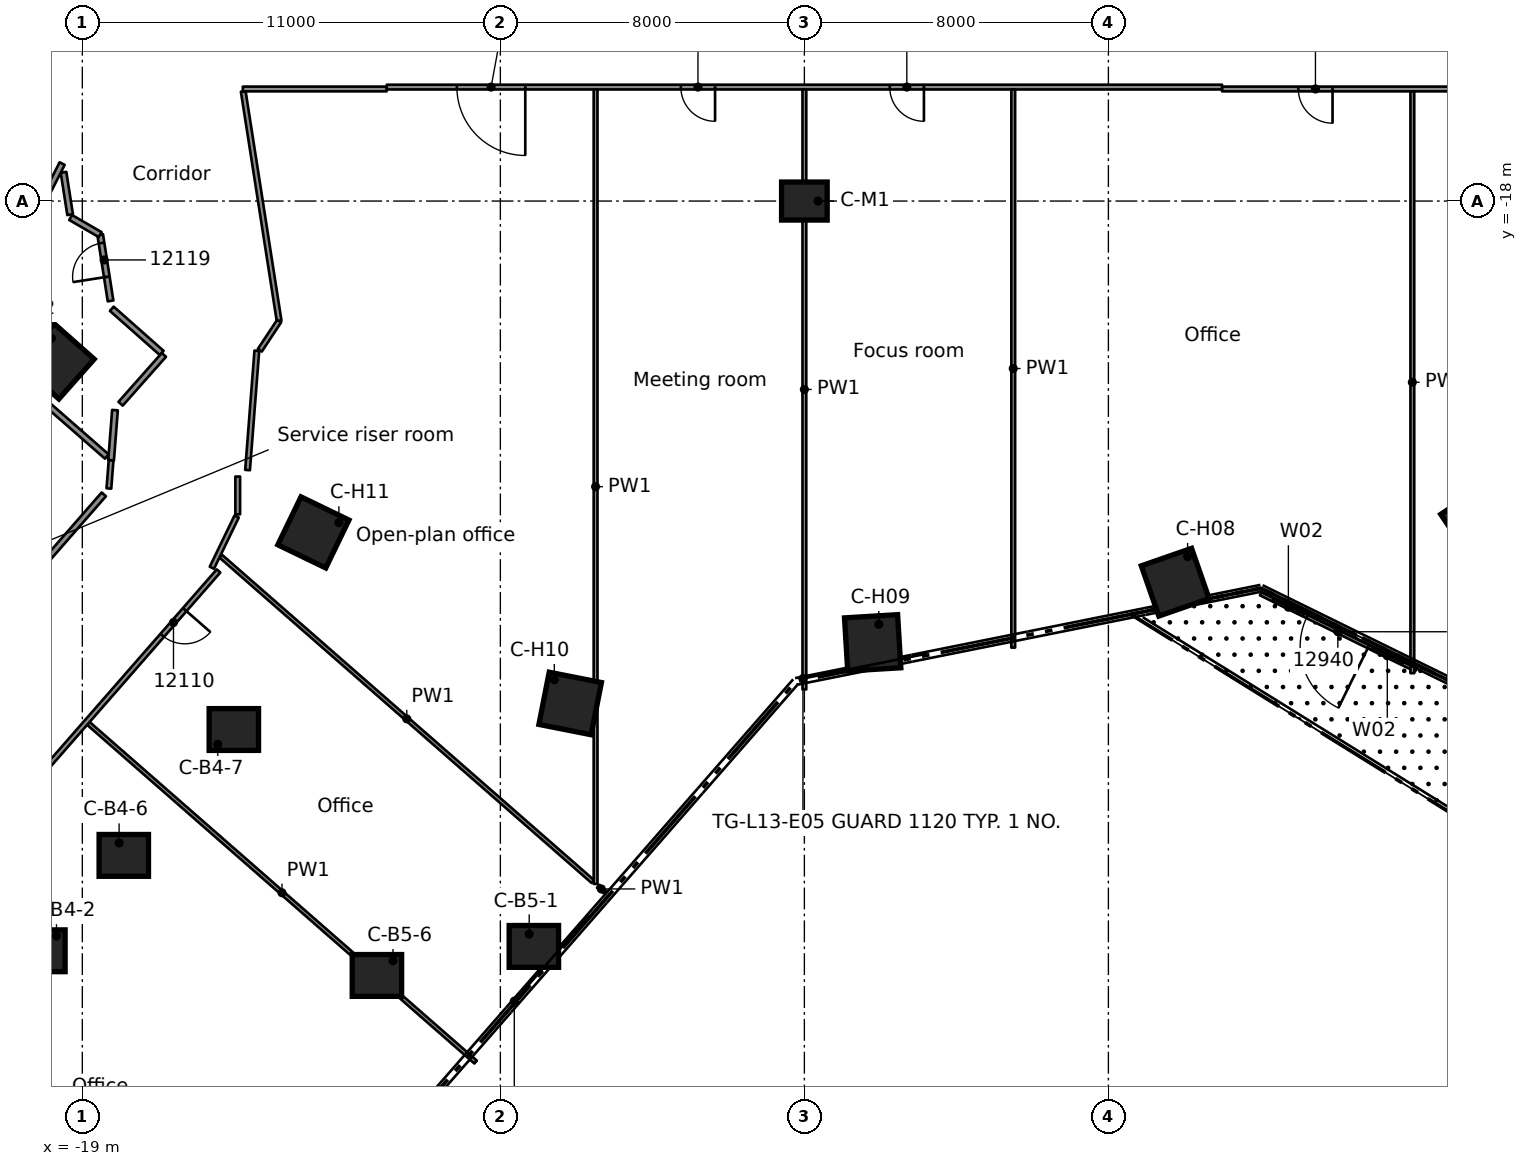
"""IFC4 building model, lengths in metres.
Left out: names, types, materials, properties, quantities, classifications, styles, units other than length and angle.
Written with IfcOpenShell. Run it as: python <this file> out.ifc"""

import sys

from ifc_helpers import new_model, si_unit, direction, frame, frame_2d, origin, origin_2d, place, context, subcontext, project, spatial, rectangle, extrude, element, fill, save


model = new_model("IFC4")
c1 = context("Model", 3, precision=1e-05, world=origin(), true_north=direction((0.0, 1.0)))
c2 = subcontext(c1, "Body", "Model", "MODEL_VIEW")
j1 = project(units=[si_unit("LENGTHUNIT", "METRE"), si_unit("PLANEANGLEUNIT", "RADIAN")], contexts=[c1])
p1 = place(None, origin())
s1 = spatial("IfcSite", under=j1, at=p1, CompositionType="ELEMENT")
p2 = place(p1, origin())
s2 = spatial("IfcBuilding", under=s1, at=p2, CompositionType="ELEMENT")
p3 = place(p2, frame((0.0, 0.0, 58.8)))
s3 = spatial("IfcBuildingStorey", under=s2, at=p3, CompositionType="ELEMENT", Elevation=58.8)
for number, where, z_axis, x_axis in (
    (1, (-20.103, -37.727, 0.0), (0.0, 0.0, 1.0), (1.0, 0.0, 0.0)),
    (2, (-17.909, -35.217, 0.0), (0.0, 0.0, 1.0), (1.0, 0.0, 0.0)),
    (3, (-15.013, -31.905, 0.0), (0.0, 0.0, 1.0), (1.0, 0.0, 0.0)),
    (4, (-7.118, -37.612, 0.0), (0.0, 0.0, 1.0), (1.0, 0.0, 0.0)),
    (5, (-11.248, -38.376, 0.0), (0.0, 0.0, 1.0), (1.0, 0.0, 0.0)),
):
    element("IfcColumn", number, at=place(p3, frame(where, z_axis=z_axis, x_axis=x_axis)), inside=s3, PredefinedType="COLUMN", context=c2, shape_type="SweptSolid", body=[
        extrude(rectangle(XDim=1.3, YDim=1.1, at=origin_2d()), origin(), (0.0, 0.0, 1.0), 3.5),
    ])
for number, where, z_axis, x_axis in (
    (6, (17.718, -26.434, 0.0), (0.0, 0.0, 1.0), (0.557, -0.831, 0.0)),
    (7, (9.758, -28.029, 0.0), (0.0, 0.0, 1.0), (0.329, -0.944, 0.0)),
    (8, (1.797, -29.624, 0.0), (0.0, 0.0, 1.0), (0.061, -0.998, 0.0)),
    (9, (-6.163, -31.22, 0.0), (0.0, 0.0, 1.0), (-0.194, -0.981, 0.0)),
    (10, (-12.92, -26.719, 0.0), (0.0, 0.0, 1.0), (-0.435, -0.9, 0.0)),
    (11, (-19.677, -22.219, 0.0), (0.0, 0.0, 1.0), (-0.663, -0.749, 0.0)),
):
    element("IfcColumn", number, at=place(p3, frame(where, z_axis=z_axis, x_axis=x_axis)), inside=s3, PredefinedType="COLUMN", context=c2, shape_type="SweptSolid", body=[
        extrude(rectangle(XDim=1.4, YDim=1.4, at=origin_2d()), origin(), (0.0, 0.0, 1.0), 3.5),
    ])
p4 = place(p3, frame((0.0, -18.0, 0.0), z_axis=(0.0, 0.0, 1.0), x_axis=(1.0, 0.0, 0.0)))
e12 = element("IfcColumn", 12, at=p4, inside=s3, PredefinedType="COLUMN", context=c2, shape_type="SweptSolid", body=[
    extrude(rectangle(XDim=1.2, YDim=1.0, at=origin_2d()), origin(), (0.0, 0.0, 1.0), 3.5),
])
p5 = place(p3, frame((16.094, -30.336, 0.0), z_axis=(0.0, 0.0, 1.0), x_axis=(-0.897538680415, 0.440935729056, 0.0)))
e13 = element("IfcWall", 13, at=p5, inside=s3, PredefinedType="STANDARD", context=c2, shape_type="SweptSolid", body=[
    extrude(rectangle(XDim=4.55, YDim=0.1, at=frame_2d((2.275, 0.0))), origin(), (0.0, 0.0, 1.0), 3.1),
])
p6 = place(p5, frame((1.39, 0.0, 0.0)))
e14 = element("IfcOpeningElement", 14, at=p6, cuts=e13, PredefinedType="OPENING", context=c2, shape_type="SweptSolid", body=[
    extrude(rectangle(XDim=1.8, YDim=2.4, at=frame_2d((0.9, 1.2))), frame((0.0, 0.06, 0.0), z_axis=(0.0, -1.0, 0.0), x_axis=(1.0, 0.0, 0.0)), (0.0, 0.0, 1.0), 0.12),
])
p7 = place(p5, frame((0.39, 0.0, 0.0)))
e15 = element("IfcOpeningElement", 15, at=p7, cuts=e13, PredefinedType="OPENING", context=c2, shape_type="SweptSolid", body=[
    extrude(rectangle(XDim=0.9, YDim=2.4, at=frame_2d((0.45, 1.2))), frame((0.0, 0.06, 0.0), z_axis=(0.0, -1.0, 0.0), x_axis=(1.0, 0.0, 0.0)), (0.0, 0.0, 1.0), 0.12),
])
p8 = place(p5, frame((3.291, 0.0, 0.0)))
e16 = element("IfcOpeningElement", 16, at=p8, cuts=e13, PredefinedType="OPENING", context=c2, shape_type="SweptSolid", body=[
    extrude(rectangle(XDim=0.9, YDim=2.4, at=frame_2d((0.45, 1.2))), frame((0.0, 0.06, 0.0), z_axis=(0.0, -1.0, 0.0), x_axis=(1.0, 0.0, 0.0)), (0.0, 0.0, 1.0), 0.12),
])
p9 = place(p3, frame((-19.495, -17.243, 0.0), z_axis=(0.0, 0.0, 1.0), x_axis=(0.154251487581, -0.988031618208, 0.0)))
e17 = element("IfcWall", 17, at=p9, inside=s3, PredefinedType="PARTITIONING", context=c2, shape_type="SweptSolid", body=[
    extrude(rectangle(XDim=1.128, YDim=0.15, at=frame_2d((0.564, 0.0))), origin(), (0.0, 0.0, 1.0), 3.08),
])
p10 = place(p3, frame((-18.257, -20.628, 0.0), z_axis=(0.0, 0.0, 1.0), x_axis=(-0.154549773899, 0.987985003625, 0.0)))
e18 = element("IfcWall", 18, at=p10, inside=s3, PredefinedType="PARTITIONING", context=c2, shape_type="SweptSolid", body=[
    extrude(rectangle(XDim=1.766, YDim=0.15, at=frame_2d((0.883, 0.0))), origin(), (0.0, 0.0, 1.0), 3.08),
])
p11 = place(p10, frame((0.642, 0.0, 0.0)))
e19 = element("IfcOpeningElement", 19, at=p11, cuts=e18, PredefinedType="OPENING", context=c2, shape_type="SweptSolid", body=[
    extrude(rectangle(XDim=0.9, YDim=2.1, at=frame_2d((0.45, 1.05))), frame((0.0, 0.085, 0.0), z_axis=(0.0, -1.0, 0.0), x_axis=(1.0, 0.0, 0.0)), (0.0, 0.0, 1.0), 0.17),
])
p12 = place(p3, frame((-14.766, -15.113, 0.0), z_axis=(0.0, 0.0, 1.0), x_axis=(0.154488884016, -0.987994526663, 0.0)))
e20 = element("IfcWall", 20, at=p12, inside=s3, PredefinedType="PARTITIONING", context=c2, shape_type="SweptSolid", body=[
    extrude(rectangle(XDim=6.117, YDim=0.125, at=frame_2d((3.059, 0.0))), origin(), (0.0, 0.0, 1.0), 3.08),
])
p13 = place(p3, frame((-18.225, -20.834, 0.0), z_axis=(0.0, 0.0, 1.0), x_axis=(0.748818770909, -0.662774809671, 0.0)))
e21 = element("IfcWall", 21, at=p13, inside=s3, PredefinedType="PARTITIONING", context=c2, shape_type="SweptSolid", body=[
    extrude(rectangle(XDim=1.756, YDim=0.15, at=frame_2d((0.878, 0.0))), origin(), (0.0, 0.0, 1.0), 3.08),
])
p14 = place(p3, frame((-18.841, -31.745, 0.0), z_axis=(0.0, 0.0, 1.0), x_axis=(0.752778878966, -0.65827346854, 0.0)))
e22 = element("IfcWall", 22, at=p14, inside=s3, PredefinedType="PARTITIONING", context=c2, shape_type="SweptSolid", body=[
    extrude(rectangle(XDim=13.537, YDim=0.1, at=frame_2d((6.769, 0.0))), origin(), (0.0, 0.0, 1.0), 3.08),
])
p15 = place(p3, frame((-22.444, -21.147, 0.0), z_axis=(0.0, 0.0, 1.0), x_axis=(0.75277438398, -0.658278608815, 0.0)))
e23 = element("IfcWall", 23, at=p15, inside=s3, PredefinedType="PARTITIONING", context=c2, shape_type="SweptSolid", body=[
    extrude(rectangle(XDim=5.431, YDim=0.15, at=frame_2d((2.715, 0.0))), origin(), (0.0, 0.0, 1.0), 3.08),
])
p16 = place(p3, frame((-15.359, -27.343, 0.0), z_axis=(0.0, 0.0, 1.0), x_axis=(0.752799867841, -0.658249465612, 0.0)))
e24 = element("IfcWall", 24, at=p16, inside=s3, PredefinedType="PARTITIONING", context=c2, shape_type="SweptSolid", body=[
    extrude(rectangle(XDim=13.009, YDim=0.1, at=frame_2d((6.504, 0.0))), origin(), (0.0, 0.0, 1.0), 3.08),
])
p17 = place(p3, frame((-5.426, -36.028, 0.0), z_axis=(0.0, 0.0, 1.0), x_axis=(0.753404579801, -0.657557251602, 0.0)))
e25 = element("IfcWall", 25, at=p17, inside=s3, PredefinedType="PARTITIONING", context=c2, shape_type="SweptSolid", body=[
    extrude(rectangle(XDim=0.219, YDim=0.1, at=frame_2d((0.109, 0.0))), origin(), (0.0, 0.0, 1.0), 3.08),
])
p18 = place(p3, frame((-14.776, -15.051, 0.0), z_axis=(0.0, 0.0, 1.0), x_axis=(1.0, 0.0, 0.0)))
e26 = element("IfcWall", 26, at=p18, inside=s3, PredefinedType="PARTITIONING", context=c2, shape_type="SweptSolid", body=[
    extrude(rectangle(XDim=3.785, YDim=0.125, at=frame_2d((1.893, 0.0))), origin(), (0.0, 0.0, 1.0), 3.08),
])
p19 = place(p3, frame((20.906, -15.051, 0.0), z_axis=(0.0, 0.0, 1.0), x_axis=(-1.0, 0.0, 0.0)))
e27 = element("IfcWall", 27, at=p19, inside=s3, PredefinedType="PARTITIONING", context=c2, shape_type="SweptSolid", body=[
    extrude(rectangle(XDim=9.915, YDim=0.125, at=frame_2d((4.958, 0.0))), origin(), (0.0, 0.0, 1.0), 3.08),
])
p20 = place(p19, frame((7.008, 0.0, 0.0)))
e28 = element("IfcOpeningElement", 28, at=p20, cuts=e27, PredefinedType="OPENING", context=c2, shape_type="SweptSolid", body=[
    extrude(rectangle(XDim=0.9, YDim=2.1, at=frame_2d((0.45, 1.05))), frame((0.0, 0.073, 0.0), z_axis=(0.0, -1.0, 0.0), x_axis=(1.0, 0.0, 0.0)), (0.0, 0.0, 1.0), 0.145),
])
p21 = place(p19, frame((2.002, 0.0, 0.0)))
e29 = element("IfcOpeningElement", 29, at=p21, cuts=e27, PredefinedType="OPENING", context=c2, shape_type="SweptSolid", body=[
    extrude(rectangle(XDim=0.9, YDim=2.1, at=frame_2d((0.45, 1.05))), frame((0.0, 0.073, 0.0), z_axis=(0.0, -1.0, 0.0), x_axis=(1.0, 0.0, 0.0)), (0.0, 0.0, 1.0), 0.145),
])
p22 = place(p3, frame((10.99, -15.001, 0.0), z_axis=(0.0, 0.0, 1.0), x_axis=(-1.0, 0.0, 0.0)))
e30 = element("IfcWall", 30, at=p22, inside=s3, PredefinedType="PARTITIONING", context=c2, shape_type="SweptSolid", body=[
    extrude(rectangle(XDim=21.98, YDim=0.125, at=frame_2d((10.99, 0.0))), origin(), (0.0, 0.0, 1.0), 3.08),
])
p23 = place(p22, frame((18.334, 0.0, 0.0)))
e31 = element("IfcOpeningElement", 31, at=p23, cuts=e30, PredefinedType="OPENING", context=c2, shape_type="SweptSolid", body=[
    extrude(rectangle(XDim=1.8, YDim=2.1, at=frame_2d((0.9, 1.05))), frame((0.0, 0.073, 0.0), z_axis=(0.0, -1.0, 0.0), x_axis=(1.0, 0.0, 0.0)), (0.0, 0.0, 1.0), 0.145),
])
p24 = place(p22, frame((13.34, 0.0, 0.0)))
e32 = element("IfcOpeningElement", 32, at=p24, cuts=e30, PredefinedType="OPENING", context=c2, shape_type="SweptSolid", body=[
    extrude(rectangle(XDim=0.9, YDim=2.1, at=frame_2d((0.45, 1.05))), frame((0.0, 0.073, 0.0), z_axis=(0.0, -1.0, 0.0), x_axis=(1.0, 0.0, 0.0)), (0.0, 0.0, 1.0), 0.145),
])
p25 = place(p22, frame((7.844, 0.0, 0.0)))
e33 = element("IfcOpeningElement", 33, at=p25, cuts=e30, PredefinedType="OPENING", context=c2, shape_type="SweptSolid", body=[
    extrude(rectangle(XDim=0.9, YDim=2.1, at=frame_2d((0.45, 1.05))), frame((0.0, 0.073, 0.0), z_axis=(0.0, -1.0, 0.0), x_axis=(1.0, 0.0, 0.0)), (0.0, 0.0, 1.0), 0.145),
])
p26 = place(p3, frame((-14.33, -21.927, 0.0), z_axis=(0.0, 0.0, 1.0), x_axis=(0.551461091015, 0.834200614418, 0.0)))
e34 = element("IfcWall", 34, at=p26, inside=s3, PredefinedType="PARTITIONING", context=c2, shape_type="SweptSolid", body=[
    extrude(rectangle(XDim=0.923, YDim=0.125, at=frame_2d((0.461, 0.0))), origin(), (0.0, 0.0, 1.0), 3.08),
])
p27 = place(p3, frame((-19.308, -18.433, 0.0), z_axis=(0.0, 0.0, 1.0), x_axis=(0.865674137441, -0.5006079182, 0.0)))
e35 = element("IfcWall", 35, at=p27, inside=s3, PredefinedType="PARTITIONING", context=c2, shape_type="SweptSolid", body=[
    extrude(rectangle(XDim=0.899, YDim=0.15, at=frame_2d((0.449, 0.0))), origin(), (0.0, 0.0, 1.0), 3.08),
])
p28 = place(p3, frame((-17.993, -23.333, 0.0), z_axis=(0.0, 0.0, 1.0), x_axis=(0.663312943568, 0.748342126902, 0.0)))
e36 = element("IfcWall", 36, at=p28, inside=s3, PredefinedType="PARTITIONING", context=c2, shape_type="SweptSolid", body=[
    extrude(rectangle(XDim=1.717, YDim=0.15, at=frame_2d((0.858, 0.0))), origin(), (0.0, 0.0, 1.0), 3.08),
])
p29 = place(p3, frame((-15.416, -27.733, 0.0), z_axis=(0.0, 0.0, 1.0), x_axis=(-0.658232849435, -0.75281439673, 0.0)))
e37 = element("IfcWall", 37, at=p29, inside=s3, PredefinedType="PARTITIONING", context=c2, shape_type="SweptSolid", body=[
    extrude(rectangle(XDim=19.274, YDim=0.125, at=frame_2d((9.637, 0.0))), origin(), (0.0, 0.0, 1.0), 3.08),
])
p30 = place(p29, frame((1.351, 0.0, 0.0)))
e38 = element("IfcOpeningElement", 38, at=p30, cuts=e37, PredefinedType="OPENING", context=c2, shape_type="SweptSolid", body=[
    extrude(rectangle(XDim=0.9, YDim=2.1, at=frame_2d((0.45, 1.05))), frame((0.0, 0.073, 0.0), z_axis=(0.0, -1.0, 0.0), x_axis=(1.0, 0.0, 0.0)), (0.0, 0.0, 1.0), 0.145),
])
p31 = place(p29, frame((14.425, 0.0, 0.0)))
e39 = element("IfcOpeningElement", 39, at=p31, cuts=e37, PredefinedType="OPENING", context=c2, shape_type="SweptSolid", body=[
    extrude(rectangle(XDim=0.9, YDim=2.1, at=frame_2d((0.45, 1.05))), frame((0.0, 0.073, 0.0), z_axis=(0.0, -1.0, 0.0), x_axis=(1.0, 0.0, 0.0)), (0.0, 0.0, 1.0), 0.145),
])
p32 = place(p3, frame((-30.815, -39.873, 0.0), z_axis=(0.0, 0.0, 1.0), x_axis=(0.658330873818, 0.752728676601, 0.0)))
e40 = element("IfcWall", 40, at=p32, inside=s3, PredefinedType="PARTITIONING", context=c2, shape_type="SweptSolid", body=[
    extrude(rectangle(XDim=18.805, YDim=0.15, at=frame_2d((9.402, 0.0))), origin(), (0.0, 0.0, 1.0), 3.08),
])
p33 = place(p32, frame((11.778, 0.0, 0.0)))
e41 = element("IfcOpeningElement", 41, at=p33, cuts=e40, PredefinedType="OPENING", context=c2, shape_type="SweptSolid", body=[
    extrude(rectangle(XDim=0.9, YDim=2.1, at=frame_2d((0.45, 1.05))), frame((0.0, 0.085, 0.0), z_axis=(0.0, -1.0, 0.0), x_axis=(1.0, 0.0, 0.0)), (0.0, 0.0, 1.0), 0.17),
])
p34 = place(p3, frame((-20.566, -19.051, 0.0), z_axis=(0.0, 0.0, 1.0), x_axis=(0.452931516421, 0.891545310925, 0.0)))
e42 = element("IfcWall", 42, at=p34, inside=s3, PredefinedType="PARTITIONING", context=c2, shape_type="SweptSolid", body=[
    extrude(rectangle(XDim=2.285, YDim=0.15, at=frame_2d((1.143, 0.0))), origin(), (0.0, 0.0, 1.0), 3.08),
])
p35 = place(p3, frame((-15.591, -27.649, 0.0), z_axis=(0.0, 0.0, 1.0), x_axis=(0.435228188542, 0.900320178547, 0.0)))
e43 = element("IfcWall", 43, at=p35, inside=s3, PredefinedType="PARTITIONING", context=c2, shape_type="SweptSolid", body=[
    extrude(rectangle(XDim=1.496, YDim=0.125, at=frame_2d((0.748, 0.0))), origin(), (0.0, 0.0, 1.0), 3.08),
])
p36 = place(p3, frame((-18.301, -25.563, 0.0), z_axis=(0.0, 0.0, 1.0), x_axis=(0.077974163802, 0.996955380034, 0.0)))
e44 = element("IfcWall", 44, at=p36, inside=s3, PredefinedType="PARTITIONING", context=c2, shape_type="SweptSolid", body=[
    extrude(rectangle(XDim=0.745, YDim=0.125, at=frame_2d((0.373, 0.0))), origin(), (0.0, 0.0, 1.0), 3.08),
])
p37 = place(p3, frame((-14.652, -25.078, 0.0), z_axis=(0.0, 0.0, 1.0), x_axis=(0.077544442432, 0.996988896351, 0.0)))
e45 = element("IfcWall", 45, at=p37, inside=s3, PredefinedType="PARTITIONING", context=c2, shape_type="SweptSolid", body=[
    extrude(rectangle(XDim=3.148, YDim=0.125, at=frame_2d((1.574, 0.0))), origin(), (0.0, 0.0, 1.0), 3.08),
])
p38 = place(p3, frame((-18.243, -24.82, 0.0), z_axis=(0.0, 0.0, 1.0), x_axis=(0.076950501437, 0.997034914298, 0.0)))
e46 = element("IfcWall", 46, at=p38, inside=s3, PredefinedType="PARTITIONING", context=c2, shape_type="SweptSolid", body=[
    extrude(rectangle(XDim=1.323, YDim=0.15, at=frame_2d((0.662, 0.0))), origin(), (0.0, 0.0, 1.0), 3.08),
])
p39 = place(p3, frame((15.998, -30.423, 0.0), z_axis=(0.0, 0.0, 1.0), x_axis=(0.0, 1.0, 0.0)))
e47 = element("IfcWall", 47, at=p39, inside=s3, PredefinedType="PARTITIONING", context=c2, shape_type="SweptSolid", body=[
    extrude(rectangle(XDim=15.309, YDim=0.1, at=frame_2d((7.655, 0.0))), origin(), (0.0, 0.0, 1.0), 3.08),
])
p40 = place(p3, frame((5.496, -29.75, 0.0), z_axis=(0.0, 0.0, 1.0), x_axis=(0.0, 1.0, 0.0)))
e48 = element("IfcWall", 48, at=p40, inside=s3, PredefinedType="PARTITIONING", context=c2, shape_type="SweptSolid", body=[
    extrude(rectangle(XDim=14.687, YDim=0.1, at=frame_2d((7.344, 0.0))), origin(), (0.0, 0.0, 1.0), 3.08),
])
p41 = place(p3, frame((0.0, -30.851, 0.0), z_axis=(0.0, 0.0, 1.0), x_axis=(0.0, 1.0, 0.0)))
e49 = element("IfcWall", 49, at=p41, inside=s3, PredefinedType="PARTITIONING", context=c2, shape_type="SweptSolid", body=[
    extrude(rectangle(XDim=15.788, YDim=0.1, at=frame_2d((7.894, 0.0))), origin(), (0.0, 0.0, 1.0), 3.08),
])
p42 = place(p3, frame((-5.494, -35.968, 0.0), z_axis=(0.0, 0.0, 1.0), x_axis=(0.0, 1.0, 0.0)))
e50 = element("IfcWall", 50, at=p42, inside=s3, PredefinedType="PARTITIONING", context=c2, shape_type="SweptSolid", body=[
    extrude(rectangle(XDim=20.905, YDim=0.1, at=frame_2d((10.453, 0.0))), origin(), (0.0, 0.0, 1.0), 3.08),
])
p43 = place(p3, frame((-14.911, -26.244, 0.0), z_axis=(0.0, 0.0, 1.0), x_axis=(0.0, 1.0, 0.0)))
e51 = element("IfcWall", 51, at=p43, inside=s3, PredefinedType="PARTITIONING", context=c2, shape_type="SweptSolid", body=[
    extrude(rectangle(XDim=0.995, YDim=0.125, at=frame_2d((0.498, 0.0))), origin(), (0.0, 0.0, 1.0), 3.08),
])
p44 = place(p6, origin())
e52 = element("IfcDoor", 52, at=p44, inside=s3, OperationType="DOUBLE_DOOR_SINGLE_SWING", PredefinedType="DOOR", context=c2, shape_type="SweptSolid", body=[
    extrude(rectangle(XDim=1.8, YDim=2.4, at=frame_2d((0.9, 1.2))), frame((0.0, 0.025, 0.0), z_axis=(0.0, -1.0, 0.0), x_axis=(1.0, 0.0, 0.0)), (0.0, 0.0, 1.0), 0.05),
])
fill(e14, e52)
p45 = place(p7, origin())
e53 = element("IfcWindow", 53, at=p45, inside=s3, PartitioningType="SINGLE_PANEL", PredefinedType="WINDOW", context=c2, shape_type="SweptSolid", body=[
    extrude(rectangle(XDim=0.9, YDim=2.4, at=frame_2d((0.45, 1.2))), frame((0.0, 0.03, 0.0), z_axis=(0.0, -1.0, 0.0), x_axis=(1.0, 0.0, 0.0)), (0.0, 0.0, 1.0), 0.06),
])
fill(e15, e53)
p46 = place(p8, origin())
e54 = element("IfcWindow", 54, at=p46, inside=s3, PartitioningType="SINGLE_PANEL", PredefinedType="WINDOW", context=c2, shape_type="SweptSolid", body=[
    extrude(rectangle(XDim=0.9, YDim=2.4, at=frame_2d((0.45, 1.2))), frame((0.0, 0.03, 0.0), z_axis=(0.0, -1.0, 0.0), x_axis=(1.0, 0.0, 0.0)), (0.0, 0.0, 1.0), 0.06),
])
fill(e16, e54)
p47 = place(p30, origin())
e55 = element("IfcDoor", 55, at=p47, inside=s3, OperationType="SINGLE_SWING_LEFT", PredefinedType="DOOR", context=c2, shape_type="SweptSolid", body=[
    extrude(rectangle(XDim=0.9, YDim=2.1, at=frame_2d((0.45, 1.05))), frame((0.0, 0.025, 0.0), z_axis=(0.0, -1.0, 0.0), x_axis=(1.0, 0.0, 0.0)), (0.0, 0.0, 1.0), 0.05),
])
fill(e38, e55)
p48 = place(p11, origin())
e56 = element("IfcDoor", 56, at=p48, inside=s3, OperationType="SINGLE_SWING_RIGHT", PredefinedType="DOOR", context=c2, shape_type="SweptSolid", body=[
    extrude(rectangle(XDim=0.9, YDim=2.1, at=frame_2d((0.45, 1.05))), frame((0.0, 0.025, 0.0), z_axis=(0.0, -1.0, 0.0), x_axis=(1.0, 0.0, 0.0)), (0.0, 0.0, 1.0), 0.05),
])
fill(e19, e56)
p49 = place(p23, origin())
e57 = element("IfcDoor", 57, at=p49, inside=s3, OperationType="DOUBLE_DOOR_SINGLE_SWING", PredefinedType="DOOR", context=c2, shape_type="SweptSolid", body=[
    extrude(rectangle(XDim=1.8, YDim=2.1, at=frame_2d((0.9, 1.05))), frame((0.0, 0.025, 0.0), z_axis=(0.0, -1.0, 0.0), x_axis=(1.0, 0.0, 0.0)), (0.0, 0.0, 1.0), 0.05),
])
fill(e31, e57)
p50 = place(p24, origin())
e58 = element("IfcDoor", 58, at=p50, inside=s3, OperationType="SINGLE_SWING_RIGHT", PredefinedType="DOOR", context=c2, shape_type="SweptSolid", body=[
    extrude(rectangle(XDim=0.9, YDim=2.1, at=frame_2d((0.45, 1.05))), frame((0.0, 0.025, 0.0), z_axis=(0.0, -1.0, 0.0), x_axis=(1.0, 0.0, 0.0)), (0.0, 0.0, 1.0), 0.05),
])
fill(e32, e58)
p51 = place(p25, origin())
e59 = element("IfcDoor", 59, at=p51, inside=s3, OperationType="SINGLE_SWING_LEFT", PredefinedType="DOOR", context=c2, shape_type="SweptSolid", body=[
    extrude(rectangle(XDim=0.9, YDim=2.1, at=frame_2d((0.45, 1.05))), frame((0.0, 0.025, 0.0), z_axis=(0.0, -1.0, 0.0), x_axis=(1.0, 0.0, 0.0)), (0.0, 0.0, 1.0), 0.05),
])
fill(e33, e59)
p52 = place(p20, origin())
e60 = element("IfcDoor", 60, at=p52, inside=s3, OperationType="SINGLE_SWING_RIGHT", PredefinedType="DOOR", context=c2, shape_type="SweptSolid", body=[
    extrude(rectangle(XDim=0.9, YDim=2.1, at=frame_2d((0.45, 1.05))), frame((0.0, 0.025, 0.0), z_axis=(0.0, -1.0, 0.0), x_axis=(1.0, 0.0, 0.0)), (0.0, 0.0, 1.0), 0.05),
])
fill(e28, e60)
save(model, sys.argv[1])
